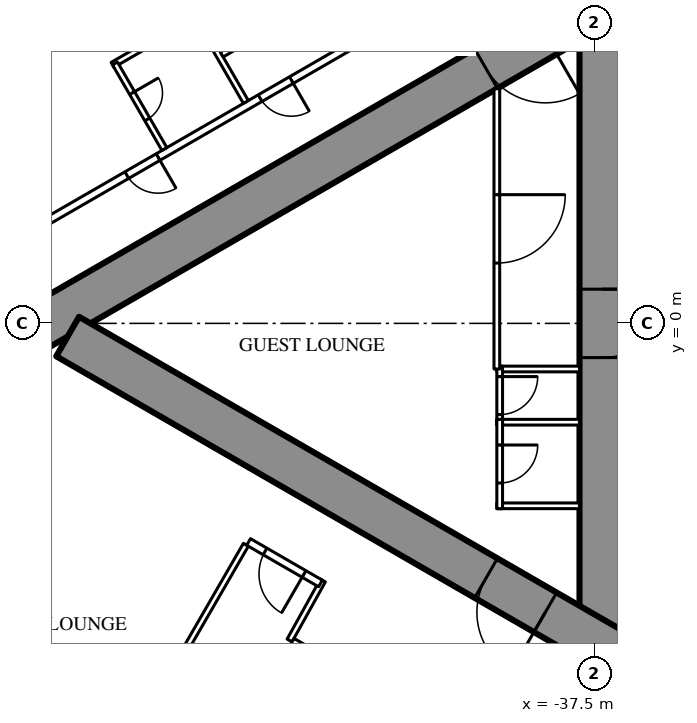
"""IFC4 building model, lengths in metres.
Left out: names, types, materials, properties, quantities, classifications, styles, units other than length and angle.
Written with IfcOpenShell. Run it as: python <this file> out.ifc"""

import sys

from ifc_helpers import new_model, si_unit, direction, frame, frame_2d, origin, place, context, subcontext, project, spatial, rectangle, extrude, element, fill, save


model = new_model("IFC4")
c1 = context("Model", 3, precision=1e-05, world=origin(), true_north=direction((0.0, 1.0)))
c2 = subcontext(c1, "Body", "Model", "MODEL_VIEW")
j1 = project(units=[si_unit("LENGTHUNIT", "METRE"), si_unit("PLANEANGLEUNIT", "RADIAN")], contexts=[c1])
p1 = place(None, origin())
s1 = spatial("IfcSite", under=j1, at=p1, CompositionType="ELEMENT")
p2 = place(p1, origin())
s2 = spatial("IfcBuilding", under=s1, at=p2, CompositionType="ELEMENT")
p3 = place(p2, frame((0.0, 0.0, 173.8)))
s3 = spatial("IfcBuildingStorey", under=s2, at=p3, CompositionType="ELEMENT", Elevation=173.8)
p4 = place(p3, frame((-37.3, 8.6, 0.0), z_axis=(0.0, 0.0, 1.0), x_axis=(0.0, -1.0, 0.0)))
e1 = element("IfcWall", 1, at=p4, inside=s3, PredefinedType="SHEAR", context=c2, shape_type="SweptSolid", body=[
    extrude(rectangle(XDim=17.2, YDim=1.2, at=frame_2d((8.6, 0.0))), origin(), (0.0, 0.0, 1.0), 3.5),
])
p5 = place(p4, frame((7.7, 0.0, 0.0)))
e2 = element("IfcOpeningElement", 2, at=p5, cuts=e1, PredefinedType="OPENING", context=c2, shape_type="SweptSolid", body=[
    extrude(rectangle(XDim=1.8, YDim=2.2, at=frame_2d((0.9, 1.1))), frame((0.0, 0.61, 0.0), z_axis=(0.0, -1.0, 0.0), x_axis=(1.0, 0.0, 0.0)), (0.0, 0.0, 1.0), 1.22),
])
p6 = place(p3, frame((-27.2, 14.3, 0.0), z_axis=(0.0, 0.0, 1.0), x_axis=(-0.866026593062, -0.499997940104, 0.0)))
e3 = element("IfcWall", 3, at=p6, inside=s3, PredefinedType="SHEAR", context=c2, shape_type="SweptSolid", body=[
    extrude(rectangle(XDim=28.946, YDim=1.2, at=frame_2d((14.473, 0.0))), origin(), (0.0, 0.0, 1.0), 3.5),
])
p7 = place(p6, frame((4.6, 0.0, 0.0)))
e4 = element("IfcOpeningElement", 4, at=p7, cuts=e3, PredefinedType="OPENING", context=c2, shape_type="SweptSolid", body=[
    extrude(rectangle(XDim=1.0, YDim=2.2, at=frame_2d((0.5, 1.1))), frame((0.0, 0.61, 0.0), z_axis=(0.0, -1.0, 0.0), x_axis=(1.0, 0.0, 0.0)), (0.0, 0.0, 1.0), 1.22),
])
p8 = place(p6, frame((13.395, 0.0, 0.0)))
e5 = element("IfcOpeningElement", 5, at=p8, cuts=e3, PredefinedType="OPENING", context=c2, shape_type="SweptSolid", body=[
    extrude(rectangle(XDim=1.8, YDim=2.2, at=frame_2d((0.9, 1.1))), frame((0.0, 0.61, 0.0), z_axis=(0.0, -1.0, 0.0), x_axis=(1.0, 0.0, 0.0)), (0.0, 0.0, 1.0), 1.22),
])
p9 = place(p3, frame((-27.2, -14.3, 0.0), z_axis=(0.0, 0.0, 1.0), x_axis=(-0.866024021859, 0.500002393557, 0.0)))
e6 = element("IfcWall", 6, at=p9, inside=s3, PredefinedType="SHEAR", context=c2, shape_type="SweptSolid", body=[
    extrude(rectangle(XDim=27.907, YDim=1.2, at=frame_2d((13.954, 0.0))), origin(), (0.0, 0.0, 1.0), 3.5),
])
p10 = place(p9, frame((4.6, 0.0, 0.0)))
e7 = element("IfcOpeningElement", 7, at=p10, cuts=e6, PredefinedType="OPENING", context=c2, shape_type="SweptSolid", body=[
    extrude(rectangle(XDim=1.0, YDim=2.2, at=frame_2d((0.5, 1.1))), frame((0.0, 0.61, 0.0), z_axis=(0.0, -1.0, 0.0), x_axis=(1.0, 0.0, 0.0)), (0.0, 0.0, 1.0), 1.22),
])
p11 = place(p9, frame((13.395, 0.0, 0.0)))
e8 = element("IfcOpeningElement", 8, at=p11, cuts=e6, PredefinedType="OPENING", context=c2, shape_type="SweptSolid", body=[
    extrude(rectangle(XDim=1.8, YDim=2.2, at=frame_2d((0.9, 1.1))), frame((0.0, 0.61, 0.0), z_axis=(0.0, -1.0, 0.0), x_axis=(1.0, 0.0, 0.0)), (0.0, 0.0, 1.0), 1.22),
])
p12 = place(p3, frame((-27.86, 16.575, 0.0), z_axis=(0.0, 0.0, 1.0), x_axis=(-0.866025533911, -0.499999774615, 0.0)))
e9 = element("IfcWall", 9, at=p12, inside=s3, PredefinedType="PARTITIONING", context=c2, shape_type="SweptSolid", body=[
    extrude(rectangle(XDim=33.149, YDim=0.2, at=frame_2d((16.575, 0.0))), origin(), (0.0, 0.0, 1.0), 3.25),
])
p13 = place(p12, frame((3.75, 0.0, 0.0)))
e10 = element("IfcOpeningElement", 10, at=p13, cuts=e9, PredefinedType="OPENING", context=c2, shape_type="SweptSolid", body=[
    extrude(rectangle(XDim=1.0, YDim=2.2, at=frame_2d((0.5, 1.1))), frame((0.0, 0.11, 0.0), z_axis=(0.0, -1.0, 0.0), x_axis=(1.0, 0.0, 0.0)), (0.0, 0.0, 1.0), 0.22),
])
p14 = place(p12, frame((20.347, 0.0, 0.0)))
e11 = element("IfcOpeningElement", 11, at=p14, cuts=e9, PredefinedType="OPENING", context=c2, shape_type="SweptSolid", body=[
    extrude(rectangle(XDim=0.95, YDim=2.2, at=frame_2d((0.475, 1.1))), frame((0.0, 0.11, 0.0), z_axis=(0.0, -1.0, 0.0), x_axis=(1.0, 0.0, 0.0)), (0.0, 0.0, 1.0), 0.22),
])
p15 = place(p12, frame((24.397, 0.0, 0.0)))
e12 = element("IfcOpeningElement", 12, at=p15, cuts=e9, PredefinedType="OPENING", context=c2, shape_type="SweptSolid", body=[
    extrude(rectangle(XDim=0.95, YDim=2.2, at=frame_2d((0.475, 1.1))), frame((0.0, 0.11, 0.0), z_axis=(0.0, -1.0, 0.0), x_axis=(1.0, 0.0, 0.0)), (0.0, 0.0, 1.0), 0.22),
])
p16 = place(p12, frame((30.042, 0.0, 0.0)))
e13 = element("IfcOpeningElement", 13, at=p16, cuts=e9, PredefinedType="OPENING", context=c2, shape_type="SweptSolid", body=[
    extrude(rectangle(XDim=0.95, YDim=2.2, at=frame_2d((0.475, 1.1))), frame((0.0, 0.11, 0.0), z_axis=(0.0, -1.0, 0.0), x_axis=(1.0, 0.0, 0.0)), (0.0, 0.0, 1.0), 0.22),
])
for number, where, z_axis, x_axis in (
    (14, (-46.679, 5.825, 0.0), (0.0, 0.0, 1.0), (-0.5, 0.866, 0.0)),
    (15, (-46.679, -5.825, 0.0), (0.0, 0.0, 1.0), (-0.5, -0.866, 0.0)),
):
    element("IfcWall", number, at=place(p3, frame(where, z_axis=z_axis, x_axis=x_axis)), inside=s3, PredefinedType="PARTITIONING", context=c2, shape_type="SweptSolid", body=[
        extrude(rectangle(XDim=6.911, YDim=0.15, at=frame_2d((3.456, 0.0))), origin(), (0.0, 0.0, 1.0), 2.3),
    ])
p17 = place(p3, frame((-44.652, -6.764, 0.0), z_axis=(0.0, 0.0, 1.0), x_axis=(-0.485424724123, -0.874278466629, 0.0)))
e16 = element("IfcWall", 16, at=p17, inside=s3, PredefinedType="PARTITIONING", context=c2, shape_type="SweptSolid", body=[
    extrude(rectangle(XDim=1.805, YDim=0.15, at=frame_2d((0.903, 0.0))), origin(), (0.0, 0.0, 1.0), 3.25),
])
p18 = place(p3, frame((-44.715, -6.844, 0.0), z_axis=(0.0, 0.0, 1.0), x_axis=(-0.865999496279, 0.500044870432, 0.0)))
e17 = element("IfcWall", 17, at=p18, inside=s3, PredefinedType="PARTITIONING", context=c2, shape_type="SweptSolid", body=[
    extrude(rectangle(XDim=2.185, YDim=0.2, at=frame_2d((1.092, 0.0))), origin(), (0.0, 0.0, 1.0), 3.25),
])
p19 = place(p18, frame((0.5, 0.0, 0.0)))
e18 = element("IfcOpeningElement", 18, at=p19, cuts=e17, PredefinedType="OPENING", context=c2, shape_type="SweptSolid", body=[
    extrude(rectangle(XDim=1.185, YDim=2.2, at=frame_2d((0.593, 1.1))), frame((0.0, 0.11, 0.0), z_axis=(0.0, -1.0, 0.0), x_axis=(1.0, 0.0, 0.0)), (0.0, 0.0, 1.0), 0.22),
])
for number, where, z_axis, x_axis in (
    (19, (-45.17, 8.312, 0.0), (0.0, 0.0, 1.0), (-0.866, -0.5, 0.0)),
    (20, (-48.044, 8.039, 0.0), (0.0, 0.0, 1.0), (-0.866, -0.5, 0.0)),
):
    element("IfcWall", number, at=place(p3, frame(where, z_axis=z_axis, x_axis=x_axis)), inside=s3, PredefinedType="PARTITIONING", context=c2, shape_type="SweptSolid", body=[
        extrude(rectangle(XDim=2.475, YDim=0.15, at=frame_2d((1.238, 0.0))), origin(), (0.0, 0.0, 1.0), 3.25),
    ])
p20 = place(p3, frame((-48.822, 4.588, 0.0), z_axis=(0.0, 0.0, 1.0), x_axis=(-0.500006934395, 0.866021400173, 0.0)))
e21 = element("IfcWall", 21, at=p20, inside=s3, PredefinedType="PARTITIONING", context=c2, shape_type="SweptSolid", body=[
    extrude(rectangle(XDim=2.6, YDim=0.15, at=frame_2d((1.3, 0.0))), origin(), (0.0, 0.0, 1.0), 3.25),
])
p21 = place(p20, frame((0.9, 0.0, 0.0)))
e22 = element("IfcOpeningElement", 22, at=p21, cuts=e21, PredefinedType="OPENING", context=c2, shape_type="SweptSolid", body=[
    extrude(rectangle(XDim=0.8, YDim=2.2, at=frame_2d((0.4, 1.1))), frame((0.0, 0.085, 0.0), z_axis=(0.0, -1.0, 0.0), x_axis=(1.0, 0.0, 0.0)), (0.0, 0.0, 1.0), 0.17),
])
for number, where, z_axis, x_axis in (
    (23, (-37.9, -1.2, 0.0), (0.0, 0.0, 1.0), (-1.0, 0.0, 0.0)),
    (24, (-37.9, -2.6, 0.0), (0.0, 0.0, 1.0), (-1.0, 0.0, 0.0)),
    (25, (-37.9, -4.8, 0.0), (0.0, 0.0, 1.0), (-1.0, 0.0, 0.0)),
):
    element("IfcWall", number, at=place(p3, frame(where, z_axis=z_axis, x_axis=x_axis)), inside=s3, PredefinedType="PARTITIONING", context=c2, shape_type="SweptSolid", body=[
        extrude(rectangle(XDim=2.175, YDim=0.15, at=frame_2d((1.087, 0.0))), origin(), (0.0, 0.0, 1.0), 3.25),
    ])
p22 = place(p3, frame((-40.0, -1.125, 0.0), z_axis=(0.0, 0.0, 1.0), x_axis=(0.0, -1.0, 0.0)))
e26 = element("IfcWall", 26, at=p22, inside=s3, PredefinedType="PARTITIONING", context=c2, shape_type="SweptSolid", body=[
    extrude(rectangle(XDim=1.55, YDim=0.15, at=frame_2d((0.775, 0.0))), origin(), (0.0, 0.0, 1.0), 3.25),
])
p23 = place(p22, frame((0.275, 0.0, 0.0)))
e27 = element("IfcOpeningElement", 27, at=p23, cuts=e26, PredefinedType="OPENING", context=c2, shape_type="SweptSolid", body=[
    extrude(rectangle(XDim=1.0, YDim=2.2, at=frame_2d((0.5, 1.1))), frame((0.0, 0.085, 0.0), z_axis=(0.0, -1.0, 0.0), x_axis=(1.0, 0.0, 0.0)), (0.0, 0.0, 1.0), 0.17),
])
p24 = place(p3, frame((-40.0, -2.525, 0.0), z_axis=(0.0, 0.0, 1.0), x_axis=(0.0, -1.0, 0.0)))
e28 = element("IfcWall", 28, at=p24, inside=s3, PredefinedType="PARTITIONING", context=c2, shape_type="SweptSolid", body=[
    extrude(rectangle(XDim=2.35, YDim=0.15, at=frame_2d((1.175, 0.0))), origin(), (0.0, 0.0, 1.0), 3.25),
])
p25 = place(p24, frame((0.675, 0.0, 0.0)))
e29 = element("IfcOpeningElement", 29, at=p25, cuts=e28, PredefinedType="OPENING", context=c2, shape_type="SweptSolid", body=[
    extrude(rectangle(XDim=1.0, YDim=2.2, at=frame_2d((0.5, 1.1))), frame((0.0, 0.085, 0.0), z_axis=(0.0, -1.0, 0.0), x_axis=(1.0, 0.0, 0.0)), (0.0, 0.0, 1.0), 0.17),
])
p26 = place(p3, frame((-40.075, 6.174, 0.0), z_axis=(0.0, 0.0, 1.0), x_axis=(0.0, -1.0, 0.0)))
e30 = element("IfcWall", 30, at=p26, inside=s3, PredefinedType="PARTITIONING", context=c2, shape_type="SweptSolid", body=[
    extrude(rectangle(XDim=7.374, YDim=0.15, at=frame_2d((3.687, 0.0))), origin(), (0.0, 0.0, 1.0), 3.25),
])
p27 = place(p26, frame((2.787, 0.0, 0.0)))
e31 = element("IfcOpeningElement", 31, at=p27, cuts=e30, PredefinedType="OPENING", context=c2, shape_type="SweptSolid", body=[
    extrude(rectangle(XDim=1.8, YDim=2.2, at=frame_2d((0.9, 1.1))), frame((0.0, 0.085, 0.0), z_axis=(0.0, -1.0, 0.0), x_axis=(1.0, 0.0, 0.0)), (0.0, 0.0, 1.0), 0.17),
])
p28 = place(p3, frame((-39.758, -11.697, 0.0), z_axis=(0.0, 0.0, 1.0), x_axis=(-0.866024194504, 0.500002094529, 0.0)))
e32 = element("IfcWall", 32, at=p28, inside=s3, PredefinedType="PARTITIONING", context=c2, shape_type="SweptSolid", body=[
    extrude(rectangle(XDim=6.6, YDim=0.25, at=frame_2d((3.3, 0.0))), origin(), (0.0, 0.0, 1.0), 3.25),
])
p29 = place(p28, frame((0.75, 0.0, 0.0)))
e33 = element("IfcOpeningElement", 33, at=p29, cuts=e32, PredefinedType="OPENING", context=c2, shape_type="SweptSolid", body=[
    extrude(rectangle(XDim=1.1, YDim=2.2, at=frame_2d((0.55, 1.1))), frame((0.0, 0.135, 0.0), z_axis=(0.0, -1.0, 0.0), x_axis=(1.0, 0.0, 0.0)), (0.0, 0.0, 1.0), 0.27),
])
p30 = place(p28, frame((2.75, 0.0, 0.0)))
e34 = element("IfcOpeningElement", 34, at=p30, cuts=e32, PredefinedType="OPENING", context=c2, shape_type="SweptSolid", body=[
    extrude(rectangle(XDim=1.1, YDim=2.2, at=frame_2d((0.55, 1.1))), frame((0.0, 0.135, 0.0), z_axis=(0.0, -1.0, 0.0), x_axis=(1.0, 0.0, 0.0)), (0.0, 0.0, 1.0), 0.27),
])
p31 = place(p28, frame((4.75, 0.0, 0.0)))
e35 = element("IfcOpeningElement", 35, at=p31, cuts=e32, PredefinedType="OPENING", context=c2, shape_type="SweptSolid", body=[
    extrude(rectangle(XDim=1.1, YDim=2.2, at=frame_2d((0.55, 1.1))), frame((0.0, 0.135, 0.0), z_axis=(0.0, -1.0, 0.0), x_axis=(1.0, 0.0, 0.0)), (0.0, 0.0, 1.0), 0.27),
])
p32 = place(p14, origin())
e36 = element("IfcDoor", 36, at=p32, inside=s3, OperationType="SINGLE_SWING_LEFT", PredefinedType="DOOR", context=c2, shape_type="SweptSolid", body=[
    extrude(rectangle(XDim=0.95, YDim=2.2, at=frame_2d((0.475, 1.1))), frame((0.0, 0.025, 0.0), z_axis=(0.0, -1.0, 0.0), x_axis=(1.0, 0.0, 0.0)), (0.0, 0.0, 1.0), 0.05),
])
fill(e11, e36)
p33 = place(p21, origin())
e37 = element("IfcDoor", 37, at=p33, inside=s3, OperationType="SINGLE_SWING_RIGHT", PredefinedType="DOOR", context=c2, shape_type="SweptSolid", body=[
    extrude(rectangle(XDim=0.8, YDim=2.2, at=frame_2d((0.4, 1.1))), frame((0.0, 0.025, 0.0), z_axis=(0.0, -1.0, 0.0), x_axis=(1.0, 0.0, 0.0)), (0.0, 0.0, 1.0), 0.05),
])
fill(e22, e37)
p34 = place(p15, origin())
e38 = element("IfcDoor", 38, at=p34, inside=s3, OperationType="SINGLE_SWING_LEFT", PredefinedType="DOOR", context=c2, shape_type="SweptSolid", body=[
    extrude(rectangle(XDim=0.95, YDim=2.2, at=frame_2d((0.475, 1.1))), frame((0.0, 0.025, 0.0), z_axis=(0.0, -1.0, 0.0), x_axis=(1.0, 0.0, 0.0)), (0.0, 0.0, 1.0), 0.05),
])
fill(e12, e38)
p35 = place(p19, origin())
e39 = element("IfcDoor", 39, at=p35, inside=s3, OperationType="SINGLE_SWING_LEFT", PredefinedType="DOOR", context=c2, shape_type="SweptSolid", body=[
    extrude(rectangle(XDim=1.185, YDim=2.2, at=frame_2d((0.593, 1.1))), frame((0.0, 0.025, 0.0), z_axis=(0.0, -1.0, 0.0), x_axis=(1.0, 0.0, 0.0)), (0.0, 0.0, 1.0), 0.05),
])
fill(e18, e39)
p36 = place(p23, origin())
e40 = element("IfcDoor", 40, at=p36, inside=s3, OperationType="SINGLE_SWING_LEFT", PredefinedType="DOOR", context=c2, shape_type="SweptSolid", body=[
    extrude(rectangle(XDim=1.0, YDim=2.2, at=frame_2d((0.5, 1.1))), frame((0.0, 0.025, 0.0), z_axis=(0.0, -1.0, 0.0), x_axis=(1.0, 0.0, 0.0)), (0.0, 0.0, 1.0), 0.05),
])
fill(e27, e40)
p37 = place(p25, origin())
e41 = element("IfcDoor", 41, at=p37, inside=s3, OperationType="SINGLE_SWING_LEFT", PredefinedType="DOOR", context=c2, shape_type="SweptSolid", body=[
    extrude(rectangle(XDim=1.0, YDim=2.2, at=frame_2d((0.5, 1.1))), frame((0.0, 0.025, 0.0), z_axis=(0.0, -1.0, 0.0), x_axis=(1.0, 0.0, 0.0)), (0.0, 0.0, 1.0), 0.05),
])
fill(e29, e41)
p38 = place(p27, origin())
e42 = element("IfcDoor", 42, at=p38, inside=s3, OperationType="DOUBLE_DOOR_SINGLE_SWING", PredefinedType="DOOR", context=c2, shape_type="SweptSolid", body=[
    extrude(rectangle(XDim=1.8, YDim=2.2, at=frame_2d((0.9, 1.1))), frame((0.0, 0.025, 0.0), z_axis=(0.0, -1.0, 0.0), x_axis=(1.0, 0.0, 0.0)), (0.0, 0.0, 1.0), 0.05),
])
fill(e31, e42)
p39 = place(p8, origin())
e43 = element("IfcDoor", 43, at=p39, inside=s3, OperationType="DOUBLE_DOOR_SINGLE_SWING", PredefinedType="DOOR", context=c2, shape_type="SweptSolid", body=[
    extrude(rectangle(XDim=1.8, YDim=2.2, at=frame_2d((0.9, 1.1))), frame((0.0, 0.025, 0.0), z_axis=(0.0, -1.0, 0.0), x_axis=(1.0, 0.0, 0.0)), (0.0, 0.0, 1.0), 0.05),
])
fill(e5, e43)
p40 = place(p11, origin())
e44 = element("IfcDoor", 44, at=p40, inside=s3, OperationType="DOUBLE_DOOR_SINGLE_SWING", PredefinedType="DOOR", context=c2, shape_type="SweptSolid", body=[
    extrude(rectangle(XDim=1.8, YDim=2.2, at=frame_2d((0.9, 1.1))), frame((0.0, 0.025, 0.0), z_axis=(0.0, -1.0, 0.0), x_axis=(1.0, 0.0, 0.0)), (0.0, 0.0, 1.0), 0.05),
])
fill(e8, e44)
p41 = place(p5, origin())
e45 = element("IfcDoor", 45, at=p41, inside=s3, OperationType="DOUBLE_DOOR_SINGLE_SWING", PredefinedType="DOOR", context=c2, shape_type="SweptSolid", body=[
    extrude(rectangle(XDim=1.8, YDim=2.2, at=frame_2d((0.9, 1.1))), frame((0.0, 0.025, 0.0), z_axis=(0.0, -1.0, 0.0), x_axis=(1.0, 0.0, 0.0)), (0.0, 0.0, 1.0), 0.05),
])
fill(e2, e45)
save(model, sys.argv[1])
